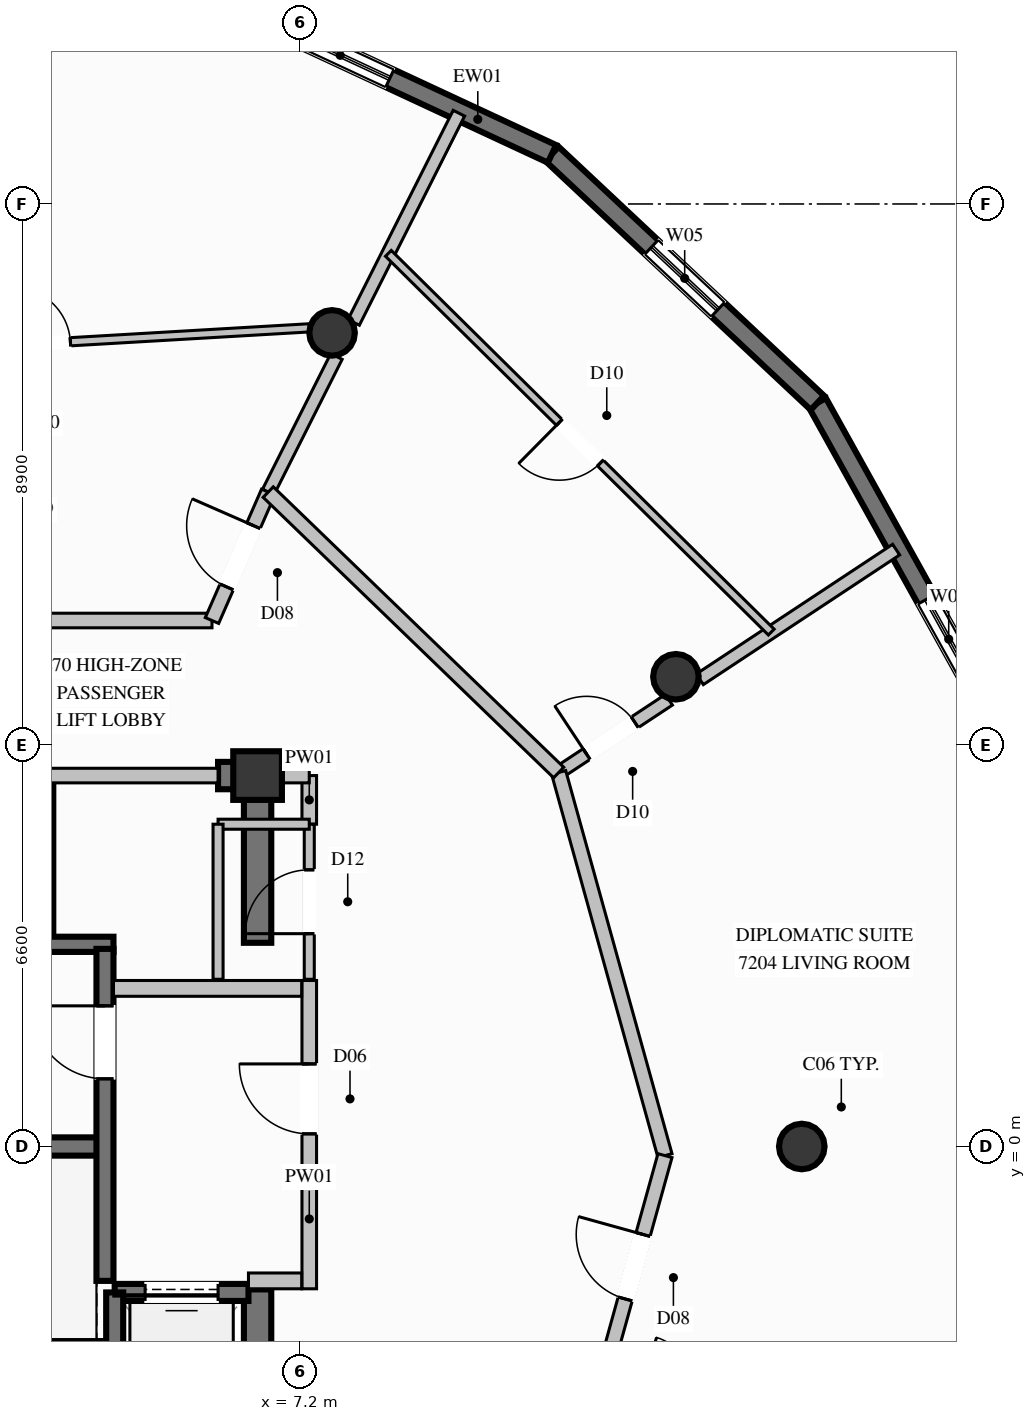
"""IFC4 building model, lengths in metres.
Left out: names, types, materials, properties, quantities, classifications, styles, units other than length and angle.
Written with IfcOpenShell. Run it as: python <this file> out.ifc"""

import sys

from ifc_helpers import new_model, si_unit, direction, frame, frame_2d, origin, origin_2d, place, context, subcontext, project, spatial, rectangle, circle, extrude, element, fill, save


model = new_model("IFC4")
c1 = context("Model", 3, precision=1e-05, world=origin(), true_north=direction((0.0, 1.0)))
c2 = subcontext(c1, "Body", "Model", "MODEL_VIEW")
j1 = project(units=[si_unit("LENGTHUNIT", "METRE"), si_unit("PLANEANGLEUNIT", "RADIAN")], contexts=[c1])
p1 = place(None, origin())
s1 = spatial("IfcSite", under=j1, at=p1, CompositionType="ELEMENT")
p2 = place(p1, origin())
s2 = spatial("IfcBuilding", under=s1, at=p2, CompositionType="ELEMENT")
p3 = place(p2, frame((0.0, 0.0, 270.6)))
s3 = spatial("IfcBuildingStorey", under=s2, at=p3, CompositionType="ELEMENT", Elevation=270.6)
p4 = place(p3, frame((6.5, 6.1, 0.0), z_axis=(0.0, 0.0, 1.0), x_axis=(1.0, 0.0, 0.0)))
e1 = element("IfcColumn", 1, at=p4, inside=s3, PredefinedType="COLUMN", context=c2, shape_type="SweptSolid", body=[
    extrude(rectangle(XDim=0.8, YDim=0.8, at=origin_2d()), origin(), (0.0, 0.0, 1.0), 3.8),
])
p5 = place(p3, frame((-3.99, 0.0, 0.0), z_axis=(0.0, 0.0, 1.0), x_axis=(1.0, 0.0, 0.0)))
e2 = element("IfcWall", 2, at=p5, inside=s3, PredefinedType="SHEAR", context=c2, shape_type="SweptSolid", body=[
    extrude(rectangle(XDim=7.98, YDim=0.3, at=frame_2d((3.99, 0.0))), origin(), (0.0, 0.0, 1.0), 3.8),
])
for number, where, z_axis, x_axis in (
    (3, (-4.13, -3.325, 0.0), (0.0, 0.0, 1.0), (1.0, 0.0, 0.0)),
    (4, (-4.13, 3.325, 0.0), (0.0, 0.0, 1.0), (1.0, 0.0, 0.0)),
):
    element("IfcWall", number, at=place(p3, frame(where, z_axis=z_axis, x_axis=x_axis)), inside=s3, PredefinedType="SOLIDWALL", context=c2, shape_type="SweptSolid", body=[
        extrude(rectangle(XDim=8.26, YDim=0.25, at=frame_2d((4.13, 0.0))), origin(), (0.0, 0.0, 1.0), 3.8),
    ])
p6 = place(p3, frame((5.85, 6.1, 0.0), z_axis=(0.0, 0.0, 1.0), x_axis=(1.0, 0.0, 0.0)))
e5 = element("IfcWall", 5, at=p6, inside=s3, PredefinedType="SHEAR", context=c2, shape_type="SweptSolid", body=[
    extrude(rectangle(XDim=0.425, YDim=0.45, at=frame_2d((0.212, 0.0))), origin(), (0.0, 0.0, 1.0), 3.8),
])
p7 = place(p3, frame((6.5, -6.325, 0.0), z_axis=(0.0, 0.0, 1.0), x_axis=(0.0, 1.0, 0.0)))
e6 = element("IfcWall", 6, at=p7, inside=s3, PredefinedType="SHEAR", context=c2, shape_type="SweptSolid", body=[
    extrude(rectangle(XDim=3.975, YDim=0.45, at=frame_2d((1.987, 0.0))), origin(), (0.0, 0.0, 1.0), 3.8),
])
p8 = place(p3, frame((6.5, 3.35, 0.0), z_axis=(0.0, 0.0, 1.0), x_axis=(0.0, 1.0, 0.0)))
e7 = element("IfcWall", 7, at=p8, inside=s3, PredefinedType="SHEAR", context=c2, shape_type="SweptSolid", body=[
    extrude(rectangle(XDim=2.975, YDim=0.45, at=frame_2d((1.487, 0.0))), origin(), (0.0, 0.0, 1.0), 3.8),
])
for number, where, z_axis, x_axis in (
    (8, (15.45, 0.0, 0.0), (0.0, 0.0, 1.0), (1.0, 0.0, 0.0)),
    (9, (13.38, 7.725, 0.0), (0.0, 0.0, 1.0), (1.0, 0.0, 0.0)),
    (10, (7.725, 13.38, 0.0), (0.0, 0.0, 1.0), (1.0, 0.0, 0.0)),
):
    element("IfcColumn", number, at=place(p3, frame(where, z_axis=z_axis, x_axis=x_axis)), inside=s3, PredefinedType="COLUMN", context=c2, shape_type="SweptSolid", body=[
        extrude(circle(Radius=0.375, at=origin_2d()), origin(), (0.0, 0.0, 1.0), 3.8),
    ])
p9 = place(p3, frame((15.707, 12.23, 0.0), z_axis=(0.0, 0.0, 1.0), x_axis=(0.485704572822, -0.87412302792, 0.0)))
e11 = element("IfcWall", 11, at=p9, inside=s3, PredefinedType="SOLIDWALL", context=c2, shape_type="SweptSolid", body=[
    extrude(rectangle(XDim=6.053, YDim=0.32, at=frame_2d((3.026, 0.0))), origin(), (0.0, 0.0, 1.0), 3.57),
])
p10 = place(p9, frame((3.696, 0.0, 0.85)))
e12 = element("IfcOpeningElement", 12, at=p10, cuts=e11, PredefinedType="OPENING", context=c2, shape_type="SweptSolid", body=[
    extrude(rectangle(XDim=1.5, YDim=1.2, at=frame_2d((0.75, 0.6))), frame((0.0, 0.17, 0.0), z_axis=(0.0, -1.0, 0.0), x_axis=(1.0, 0.0, 0.0)), (0.0, 0.0, 1.0), 0.34),
])
p11 = place(p3, frame((11.342, 16.324, 0.0), z_axis=(0.0, 0.0, 1.0), x_axis=(0.729385792771, -0.684102598522, 0.0)))
e13 = element("IfcWall", 13, at=p11, inside=s3, PredefinedType="SOLIDWALL", context=c2, shape_type="SweptSolid", body=[
    extrude(rectangle(XDim=5.984, YDim=0.32, at=frame_2d((2.992, 0.0))), origin(), (0.0, 0.0, 1.0), 3.57),
])
p12 = place(p11, frame((2.242, 0.0, 0.85)))
e14 = element("IfcOpeningElement", 14, at=p12, cuts=e13, PredefinedType="OPENING", context=c2, shape_type="SweptSolid", body=[
    extrude(rectangle(XDim=1.5, YDim=1.2, at=frame_2d((0.75, 0.6))), frame((0.0, 0.17, 0.0), z_axis=(0.0, -1.0, 0.0), x_axis=(1.0, 0.0, 0.0)), (0.0, 0.0, 1.0), 0.34),
])
p13 = place(p3, frame((5.979, 18.82, 0.0), z_axis=(0.0, 0.0, 1.0), x_axis=(0.90661391217, -0.421961152548, 0.0)))
e15 = element("IfcWall", 15, at=p13, inside=s3, PredefinedType="SOLIDWALL", context=c2, shape_type="SweptSolid", body=[
    extrude(rectangle(XDim=5.916, YDim=0.32, at=frame_2d((2.958, 0.0))), origin(), (0.0, 0.0, 1.0), 3.57),
])
p14 = place(p13, frame((1.173, 0.0, 0.35)))
e16 = element("IfcOpeningElement", 16, at=p14, cuts=e15, PredefinedType="OPENING", context=c2, shape_type="SweptSolid", body=[
    extrude(rectangle(XDim=1.8, YDim=2.6, at=frame_2d((0.9, 1.3))), frame((0.0, 0.17, 0.0), z_axis=(0.0, -1.0, 0.0), x_axis=(1.0, 0.0, 0.0)), (0.0, 0.0, 1.0), 0.34),
])
p15 = place(p3, frame((3.0, 3.5, 0.0), z_axis=(0.0, 0.0, 1.0), x_axis=(0.0, 1.0, 0.0)))
e17 = element("IfcWall", 17, at=p15, inside=s3, PredefinedType="SOLIDWALL", context=c2, shape_type="SweptSolid", body=[
    extrude(rectangle(XDim=2.5, YDim=0.28, at=frame_2d((1.25, 0.0))), origin(), (0.0, 0.0, 1.0), 3.57),
])
p16 = place(p3, frame((6.35, -2.4, 0.0), z_axis=(0.0, 0.0, 1.0), x_axis=(-1.0, 0.0, 0.0)))
e18 = element("IfcWall", 18, at=p16, inside=s3, PredefinedType="SOLIDWALL", context=c2, shape_type="SweptSolid", body=[
    extrude(rectangle(XDim=2.2, YDim=0.28, at=frame_2d((1.1, 0.0))), origin(), (0.0, 0.0, 1.0), 3.57),
])
p17 = place(p16, frame((0.5, 0.0, 0.0)))
e19 = element("IfcOpeningElement", 19, at=p17, cuts=e18, PredefinedType="OPENING", context=c2, shape_type="SweptSolid", body=[
    extrude(rectangle(XDim=1.2, YDim=2.2, at=frame_2d((0.6, 1.1))), frame((0.0, 0.15, 0.0), z_axis=(0.0, -1.0, 0.0), x_axis=(1.0, 0.0, 0.0)), (0.0, 0.0, 1.0), 0.3),
])
p18 = place(p3, frame((4.15, -2.4, 0.0), z_axis=(0.0, 0.0, 1.0), x_axis=(0.0, -1.0, 0.0)))
e20 = element("IfcWall", 20, at=p18, inside=s3, PredefinedType="SOLIDWALL", context=c2, shape_type="SweptSolid", body=[
    extrude(rectangle(XDim=2.7, YDim=0.28, at=frame_2d((1.35, 0.0))), origin(), (0.0, 0.0, 1.0), 3.57),
])
p19 = place(p3, frame((3.99, -2.21, 0.0), z_axis=(0.0, 0.0, 1.0), x_axis=(0.0, 1.0, 0.0)))
e21 = element("IfcWall", 21, at=p19, inside=s3, PredefinedType="SOLIDWALL", context=c2, shape_type="SweptSolid", body=[
    extrude(rectangle(XDim=5.46, YDim=0.28, at=frame_2d((2.73, 0.0))), origin(), (0.0, 0.0, 1.0), 3.57),
])
p20 = place(p19, frame((3.323, 0.0, 0.0)))
e22 = element("IfcOpeningElement", 22, at=p20, cuts=e21, PredefinedType="OPENING", context=c2, shape_type="SweptSolid", body=[
    extrude(rectangle(XDim=1.2, YDim=2.2, at=frame_2d((0.6, 1.1))), frame((0.0, 0.15, 0.0), z_axis=(0.0, -1.0, 0.0), x_axis=(1.0, 0.0, 0.0)), (0.0, 0.0, 1.0), 0.3),
])
p21 = place(p3, frame((7.35, -2.34, 0.0), z_axis=(0.0, 0.0, 1.0), x_axis=(0.0, 1.0, 0.0)))
e23 = element("IfcWall", 23, at=p21, inside=s3, PredefinedType="PARTITIONING", context=c2, shape_type="SweptSolid", body=[
    extrude(rectangle(XDim=5.07, YDim=0.24, at=frame_2d((2.535, 0.0))), origin(), (0.0, 0.0, 1.0), 2.655),
])
p22 = place(p21, frame((2.548, 0.0, 0.0)))
e24 = element("IfcOpeningElement", 24, at=p22, cuts=e23, PredefinedType="OPENING", context=c2, shape_type="SweptSolid", body=[
    extrude(rectangle(XDim=1.15, YDim=2.2, at=frame_2d((0.575, 1.1))), frame((0.0, 0.13, 0.0), z_axis=(0.0, -1.0, 0.0), x_axis=(1.0, 0.0, 0.0)), (0.0, 0.0, 1.0), 0.26),
])
p23 = place(p3, frame((6.35, -2.21, 0.0), z_axis=(0.0, 0.0, 1.0), x_axis=(1.0, 0.0, 0.0)))
e25 = element("IfcWall", 25, at=p23, inside=s3, PredefinedType="PARTITIONING", context=c2, shape_type="SweptSolid", body=[
    extrude(rectangle(XDim=0.875, YDim=0.26, at=frame_2d((0.438, 0.0))), origin(), (0.0, 0.0, 1.0), 3.57),
])
p24 = place(p3, frame((4.13, 2.6, 0.0), z_axis=(0.0, 0.0, 1.0), x_axis=(1.0, 0.0, 0.0)))
e26 = element("IfcWall", 26, at=p24, inside=s3, PredefinedType="PARTITIONING", context=c2, shape_type="SweptSolid", body=[
    extrude(rectangle(XDim=3.095, YDim=0.26, at=frame_2d((1.548, 0.0))), origin(), (0.0, 0.0, 1.0), 3.57),
])
p25 = place(p3, frame((-7.35, 8.65, 0.0), z_axis=(0.0, 0.0, 1.0), x_axis=(1.0, 0.0, 0.0)))
e27 = element("IfcWall", 27, at=p25, inside=s3, PredefinedType="PARTITIONING", context=c2, shape_type="SweptSolid", body=[
    extrude(rectangle(XDim=13.1, YDim=0.24, at=frame_2d((6.55, 0.0))), origin(), (0.0, 0.0, 1.0), 3.57),
])
p26 = place(p3, frame((3.0, 6.1, 0.0), z_axis=(0.0, 0.0, 1.0), x_axis=(1.0, 0.0, 0.0)))
e28 = element("IfcWall", 28, at=p26, inside=s3, PredefinedType="PARTITIONING", context=c2, shape_type="SweptSolid", body=[
    extrude(rectangle(XDim=2.85, YDim=0.24, at=frame_2d((1.425, 0.0))), origin(), (0.0, 0.0, 1.0), 2.655),
])
p27 = place(p3, frame((7.35, 5.3, 0.0), z_axis=(0.0, 0.0, 1.0), x_axis=(0.0, 1.0, 0.0)))
e29 = element("IfcWall", 29, at=p27, inside=s3, PredefinedType="PARTITIONING", context=c2, shape_type="SweptSolid", body=[
    extrude(rectangle(XDim=0.8, YDim=0.24, at=frame_2d((0.4, 0.0))), origin(), (0.0, 0.0, 1.0), 2.655),
])
p28 = place(p3, frame((6.5, 6.1, 0.0), z_axis=(0.0, 0.0, 1.0), x_axis=(1.0, 0.0, 0.0)))
e30 = element("IfcWall", 30, at=p28, inside=s3, PredefinedType="PARTITIONING", context=c2, shape_type="SweptSolid", body=[
    extrude(rectangle(XDim=0.85, YDim=0.24, at=frame_2d((0.425, 0.0))), origin(), (0.0, 0.0, 1.0), 3.011),
])
p29 = place(p3, frame((7.35, 2.75, 0.0), z_axis=(0.0, 0.0, 1.0), x_axis=(0.0, 1.0, 0.0)))
e31 = element("IfcWall", 31, at=p29, inside=s3, PredefinedType="PARTITIONING", context=c2, shape_type="SweptSolid", body=[
    extrude(rectangle(XDim=2.55, YDim=0.165, at=frame_2d((1.275, 0.0))), origin(), (0.0, 0.0, 1.0), 3.57),
])
p30 = place(p29, frame((0.75, 0.0, 0.0)))
e32 = element("IfcOpeningElement", 32, at=p30, cuts=e31, PredefinedType="OPENING", context=c2, shape_type="SweptSolid", body=[
    extrude(rectangle(XDim=1.05, YDim=2.15, at=frame_2d((0.525, 1.075))), frame((0.0, 0.093, 0.0), z_axis=(0.0, -1.0, 0.0), x_axis=(1.0, 0.0, 0.0)), (0.0, 0.0, 1.0), 0.185),
])
p31 = place(p3, frame((7.35, 5.3, 0.0), z_axis=(0.0, 0.0, 1.0), x_axis=(-1.0, 0.0, 0.0)))
e33 = element("IfcWall", 33, at=p31, inside=s3, PredefinedType="PARTITIONING", context=c2, shape_type="SweptSolid", body=[
    extrude(rectangle(XDim=1.5, YDim=0.165, at=frame_2d((0.75, 0.0))), origin(), (0.0, 0.0, 1.0), 2.655),
])
p32 = place(p3, frame((5.85, 5.3, 0.0), z_axis=(0.0, 0.0, 1.0), x_axis=(0.0, -1.0, 0.0)))
e34 = element("IfcWall", 34, at=p32, inside=s3, PredefinedType="PARTITIONING", context=c2, shape_type="SweptSolid", body=[
    extrude(rectangle(XDim=2.55, YDim=0.165, at=frame_2d((1.275, 0.0))), origin(), (0.0, 0.0, 1.0), 2.655),
])
p33 = place(p3, frame((11.452, 6.15, 0.0), z_axis=(0.0, 0.0, 1.0), x_axis=(0.834514332086, 0.550986233533, 0.0)))
e35 = element("IfcWall", 35, at=p33, inside=s3, PredefinedType="PARTITIONING", context=c2, shape_type="SweptSolid", body=[
    extrude(rectangle(XDim=2.173, YDim=0.21, at=frame_2d((1.086, 0.0))), origin(), (0.0, 0.0, 1.0), 3.011),
])
p34 = place(p33, frame((0.55, 0.0, 0.0)))
e36 = element("IfcOpeningElement", 36, at=p34, cuts=e35, PredefinedType="OPENING", context=c2, shape_type="SweptSolid", body=[
    extrude(rectangle(XDim=0.95, YDim=2.1, at=frame_2d((0.475, 1.05))), frame((0.0, 0.115, 0.0), z_axis=(0.0, -1.0, 0.0), x_axis=(1.0, 0.0, 0.0)), (0.0, 0.0, 1.0), 0.23),
])
p35 = place(p3, frame((13.773, 7.683, 0.0), z_axis=(0.0, 0.0, 1.0), x_axis=(0.834410963212, 0.551142762333, 0.0)))
e37 = element("IfcWall", 37, at=p35, inside=s3, PredefinedType="PARTITIONING", context=c2, shape_type="SweptSolid", body=[
    extrude(rectangle(XDim=3.87, YDim=0.21, at=frame_2d((1.935, 0.0))), origin(), (0.0, 0.0, 1.0), 3.57),
])
p36 = place(p3, frame((6.675, 10.762, 0.0), z_axis=(0.0, 0.0, 1.0), x_axis=(0.449481077606, 0.893289852665, 0.0)))
e38 = element("IfcWall", 38, at=p36, inside=s3, PredefinedType="PARTITIONING", context=c2, shape_type="SweptSolid", body=[
    extrude(rectangle(XDim=2.496, YDim=0.21, at=frame_2d((1.248, 0.0))), origin(), (0.0, 0.0, 1.0), 3.011),
])
p37 = place(p3, frame((8.08, 13.553, 0.0), z_axis=(0.0, 0.0, 1.0), x_axis=(0.449494481026, 0.893283108274, 0.0)))
e39 = element("IfcWall", 39, at=p37, inside=s3, PredefinedType="PARTITIONING", context=c2, shape_type="SweptSolid", body=[
    extrude(rectangle(XDim=3.851, YDim=0.21, at=frame_2d((1.925, 0.0))), origin(), (0.0, 0.0, 1.0), 3.57),
])
p38 = place(p3, frame((5.75, 8.65, 0.0), z_axis=(0.0, 0.0, 1.0), x_axis=(0.401190953907, 0.915994442398, 0.0)))
e40 = element("IfcWall", 40, at=p38, inside=s3, PredefinedType="PARTITIONING", context=c2, shape_type="SweptSolid", body=[
    extrude(rectangle(XDim=2.306, YDim=0.24, at=frame_2d((1.153, 0.0))), origin(), (0.0, 0.0, 1.0), 3.011),
])
p39 = place(p38, frame((0.603, 0.0, 0.0)))
e41 = element("IfcOpeningElement", 41, at=p39, cuts=e40, PredefinedType="OPENING", context=c2, shape_type="SweptSolid", body=[
    extrude(rectangle(XDim=1.1, YDim=2.3, at=frame_2d((0.55, 1.15))), frame((0.0, 0.13, 0.0), z_axis=(0.0, -1.0, 0.0), x_axis=(1.0, 0.0, 0.0)), (0.0, 0.0, 1.0), 0.26),
])
p40 = place(p3, frame((-2.161, 12.909, 0.0), z_axis=(0.0, 0.0, 1.0), x_axis=(0.998308345871, 0.05814160785, 0.0)))
e42 = element("IfcWall", 42, at=p40, inside=s3, PredefinedType="PARTITIONING", context=c2, shape_type="SweptSolid", body=[
    extrude(rectangle(XDim=10.233, YDim=0.135, at=frame_2d((5.117, 0.0))), origin(), (0.0, 0.0, 1.0), 3.138),
])
p41 = place(p40, frame((4.642, 0.0, 0.0)))
e43 = element("IfcOpeningElement", 43, at=p41, cuts=e42, PredefinedType="OPENING", context=c2, shape_type="SweptSolid", body=[
    extrude(rectangle(XDim=0.95, YDim=2.1, at=frame_2d((0.475, 1.05))), frame((0.0, 0.078, 0.0), z_axis=(0.0, -1.0, 0.0), x_axis=(1.0, 0.0, 0.0)), (0.0, 0.0, 1.0), 0.155),
])
p42 = place(p3, frame((13.2, -0.15, 0.0), z_axis=(0.0, 0.0, 1.0), x_axis=(-0.267374214985, 0.963592771435, 0.0)))
e44 = element("IfcWall", 44, at=p42, inside=s3, PredefinedType="PARTITIONING", context=c2, shape_type="SweptSolid", body=[
    extrude(rectangle(XDim=6.538, YDim=0.24, at=frame_2d((3.269, 0.0))), origin(), (0.0, 0.0, 1.0), 3.57),
])
p43 = place(p3, frame((12.186, -3.804, 0.0), z_axis=(0.0, 0.0, 1.0), x_axis=(0.267374891444, 0.963592583733, 0.0)))
e45 = element("IfcWall", 45, at=p43, inside=s3, PredefinedType="PARTITIONING", context=c2, shape_type="SweptSolid", body=[
    extrude(rectangle(XDim=3.792, YDim=0.24, at=frame_2d((1.896, 0.0))), origin(), (0.0, 0.0, 1.0), 3.57),
])
p44 = place(p43, frame((1.346, 0.0, 0.0)))
e46 = element("IfcOpeningElement", 46, at=p44, cuts=e45, PredefinedType="OPENING", context=c2, shape_type="SweptSolid", body=[
    extrude(rectangle(XDim=1.1, YDim=2.3, at=frame_2d((0.55, 1.15))), frame((0.0, 0.13, 0.0), z_axis=(0.0, -1.0, 0.0), x_axis=(1.0, 0.0, 0.0)), (0.0, 0.0, 1.0), 0.26),
])
p45 = place(p3, frame((11.452, 6.15, 0.0), z_axis=(0.0, 0.0, 1.0), x_axis=(-0.719407162497, 0.694588608133, 0.0)))
e47 = element("IfcWall", 47, at=p45, inside=s3, PredefinedType="PARTITIONING", context=c2, shape_type="SweptSolid", body=[
    extrude(rectangle(XDim=6.64, YDim=0.24, at=frame_2d((3.32, 0.0))), origin(), (0.0, 0.0, 1.0), 3.57),
])
p46 = place(p3, frame((14.948, 8.46, 0.0), z_axis=(0.0, 0.0, 1.0), x_axis=(-0.710996539207, 0.703195507121, 0.0)))
e48 = element("IfcWall", 48, at=p46, inside=s3, PredefinedType="PARTITIONING", context=c2, shape_type="SweptSolid", body=[
    extrude(rectangle(XDim=8.857, YDim=0.135, at=frame_2d((4.428, 0.0))), origin(), (0.0, 0.0, 1.0), 3.57),
])
p47 = place(p46, frame((3.953, 0.0, 0.0)))
e49 = element("IfcOpeningElement", 49, at=p47, cuts=e48, PredefinedType="OPENING", context=c2, shape_type="SweptSolid", body=[
    extrude(rectangle(XDim=0.95, YDim=2.1, at=frame_2d((0.475, 1.05))), frame((0.0, 0.078, 0.0), z_axis=(0.0, -1.0, 0.0), x_axis=(1.0, 0.0, 0.0)), (0.0, 0.0, 1.0), 0.155),
])
p48 = place(p10, origin())
e50 = element("IfcWindow", 50, at=p48, inside=s3, PartitioningType="SINGLE_PANEL", PredefinedType="WINDOW", context=c2, shape_type="SweptSolid", body=[
    extrude(rectangle(XDim=1.5, YDim=1.2, at=frame_2d((0.75, 0.6))), frame((0.0, 0.03, 0.0), z_axis=(0.0, -1.0, 0.0), x_axis=(1.0, 0.0, 0.0)), (0.0, 0.0, 1.0), 0.06),
])
fill(e12, e50)
p49 = place(p12, origin())
e51 = element("IfcWindow", 51, at=p49, inside=s3, PartitioningType="SINGLE_PANEL", PredefinedType="WINDOW", context=c2, shape_type="SweptSolid", body=[
    extrude(rectangle(XDim=1.5, YDim=1.2, at=frame_2d((0.75, 0.6))), frame((0.0, 0.03, 0.0), z_axis=(0.0, -1.0, 0.0), x_axis=(1.0, 0.0, 0.0)), (0.0, 0.0, 1.0), 0.06),
])
fill(e14, e51)
p50 = place(p14, origin())
e52 = element("IfcWindow", 52, at=p50, inside=s3, PartitioningType="SINGLE_PANEL", PredefinedType="WINDOW", context=c2, shape_type="SweptSolid", body=[
    extrude(rectangle(XDim=1.8, YDim=2.6, at=frame_2d((0.9, 1.3))), frame((0.0, 0.03, 0.0), z_axis=(0.0, -1.0, 0.0), x_axis=(1.0, 0.0, 0.0)), (0.0, 0.0, 1.0), 0.06),
])
fill(e16, e52)
p51 = place(p17, origin())
e53 = element("IfcDoor", 53, at=p51, inside=s3, OperationType="SLIDING_TO_LEFT", PredefinedType="DOOR", context=c2, shape_type="SweptSolid", body=[
    extrude(rectangle(XDim=1.2, YDim=2.2, at=frame_2d((0.6, 1.1))), frame((0.0, 0.025, 0.0), z_axis=(0.0, -1.0, 0.0), x_axis=(1.0, 0.0, 0.0)), (0.0, 0.0, 1.0), 0.05),
])
fill(e19, e53)
p52 = place(p20, origin())
e54 = element("IfcDoor", 54, at=p52, inside=s3, OperationType="SINGLE_SWING_RIGHT", PredefinedType="DOOR", context=c2, shape_type="SweptSolid", body=[
    extrude(rectangle(XDim=1.2, YDim=2.2, at=frame_2d((0.6, 1.1))), frame((0.0, 0.025, 0.0), z_axis=(0.0, -1.0, 0.0), x_axis=(1.0, 0.0, 0.0)), (0.0, 0.0, 1.0), 0.05),
])
fill(e22, e54)
p53 = place(p22, origin())
e55 = element("IfcDoor", 55, at=p53, inside=s3, OperationType="SINGLE_SWING_RIGHT", PredefinedType="DOOR", context=c2, shape_type="SweptSolid", body=[
    extrude(rectangle(XDim=1.15, YDim=2.2, at=frame_2d((0.575, 1.1))), frame((0.0, 0.025, 0.0), z_axis=(0.0, -1.0, 0.0), x_axis=(1.0, 0.0, 0.0)), (0.0, 0.0, 1.0), 0.05),
])
fill(e24, e55)
p54 = place(p30, origin())
e56 = element("IfcDoor", 56, at=p54, inside=s3, OperationType="SINGLE_SWING_LEFT", PredefinedType="DOOR", context=c2, shape_type="SweptSolid", body=[
    extrude(rectangle(XDim=1.05, YDim=2.15, at=frame_2d((0.525, 1.075))), frame((0.0, 0.025, 0.0), z_axis=(0.0, -1.0, 0.0), x_axis=(1.0, 0.0, 0.0)), (0.0, 0.0, 1.0), 0.05),
])
fill(e32, e56)
p55 = place(p39, origin())
e57 = element("IfcDoor", 57, at=p55, inside=s3, OperationType="SINGLE_SWING_RIGHT", PredefinedType="DOOR", context=c2, shape_type="SweptSolid", body=[
    extrude(rectangle(XDim=1.1, YDim=2.3, at=frame_2d((0.55, 1.15))), frame((0.0, 0.025, 0.0), z_axis=(0.0, -1.0, 0.0), x_axis=(1.0, 0.0, 0.0)), (0.0, 0.0, 1.0), 0.05),
])
fill(e41, e57)
p56 = place(p41, origin())
e58 = element("IfcDoor", 58, at=p56, inside=s3, OperationType="SINGLE_SWING_LEFT", PredefinedType="DOOR", context=c2, shape_type="SweptSolid", body=[
    extrude(rectangle(XDim=0.95, YDim=2.1, at=frame_2d((0.475, 1.05))), frame((0.0, 0.025, 0.0), z_axis=(0.0, -1.0, 0.0), x_axis=(1.0, 0.0, 0.0)), (0.0, 0.0, 1.0), 0.05),
])
fill(e43, e58)
p57 = place(p44, origin())
e59 = element("IfcDoor", 59, at=p57, inside=s3, OperationType="SINGLE_SWING_RIGHT", PredefinedType="DOOR", context=c2, shape_type="SweptSolid", body=[
    extrude(rectangle(XDim=1.1, YDim=2.3, at=frame_2d((0.55, 1.15))), frame((0.0, 0.025, 0.0), z_axis=(0.0, -1.0, 0.0), x_axis=(1.0, 0.0, 0.0)), (0.0, 0.0, 1.0), 0.05),
])
fill(e46, e59)
p58 = place(p34, origin())
e60 = element("IfcDoor", 60, at=p58, inside=s3, OperationType="SINGLE_SWING_LEFT", PredefinedType="DOOR", context=c2, shape_type="SweptSolid", body=[
    extrude(rectangle(XDim=0.95, YDim=2.1, at=frame_2d((0.475, 1.05))), frame((0.0, 0.025, 0.0), z_axis=(0.0, -1.0, 0.0), x_axis=(1.0, 0.0, 0.0)), (0.0, 0.0, 1.0), 0.05),
])
fill(e36, e60)
p59 = place(p47, origin())
e61 = element("IfcDoor", 61, at=p59, inside=s3, OperationType="SINGLE_SWING_RIGHT", PredefinedType="DOOR", context=c2, shape_type="SweptSolid", body=[
    extrude(rectangle(XDim=0.95, YDim=2.1, at=frame_2d((0.475, 1.05))), frame((0.0, 0.025, 0.0), z_axis=(0.0, -1.0, 0.0), x_axis=(1.0, 0.0, 0.0)), (0.0, 0.0, 1.0), 0.05),
])
fill(e49, e61)
save(model, sys.argv[1])
